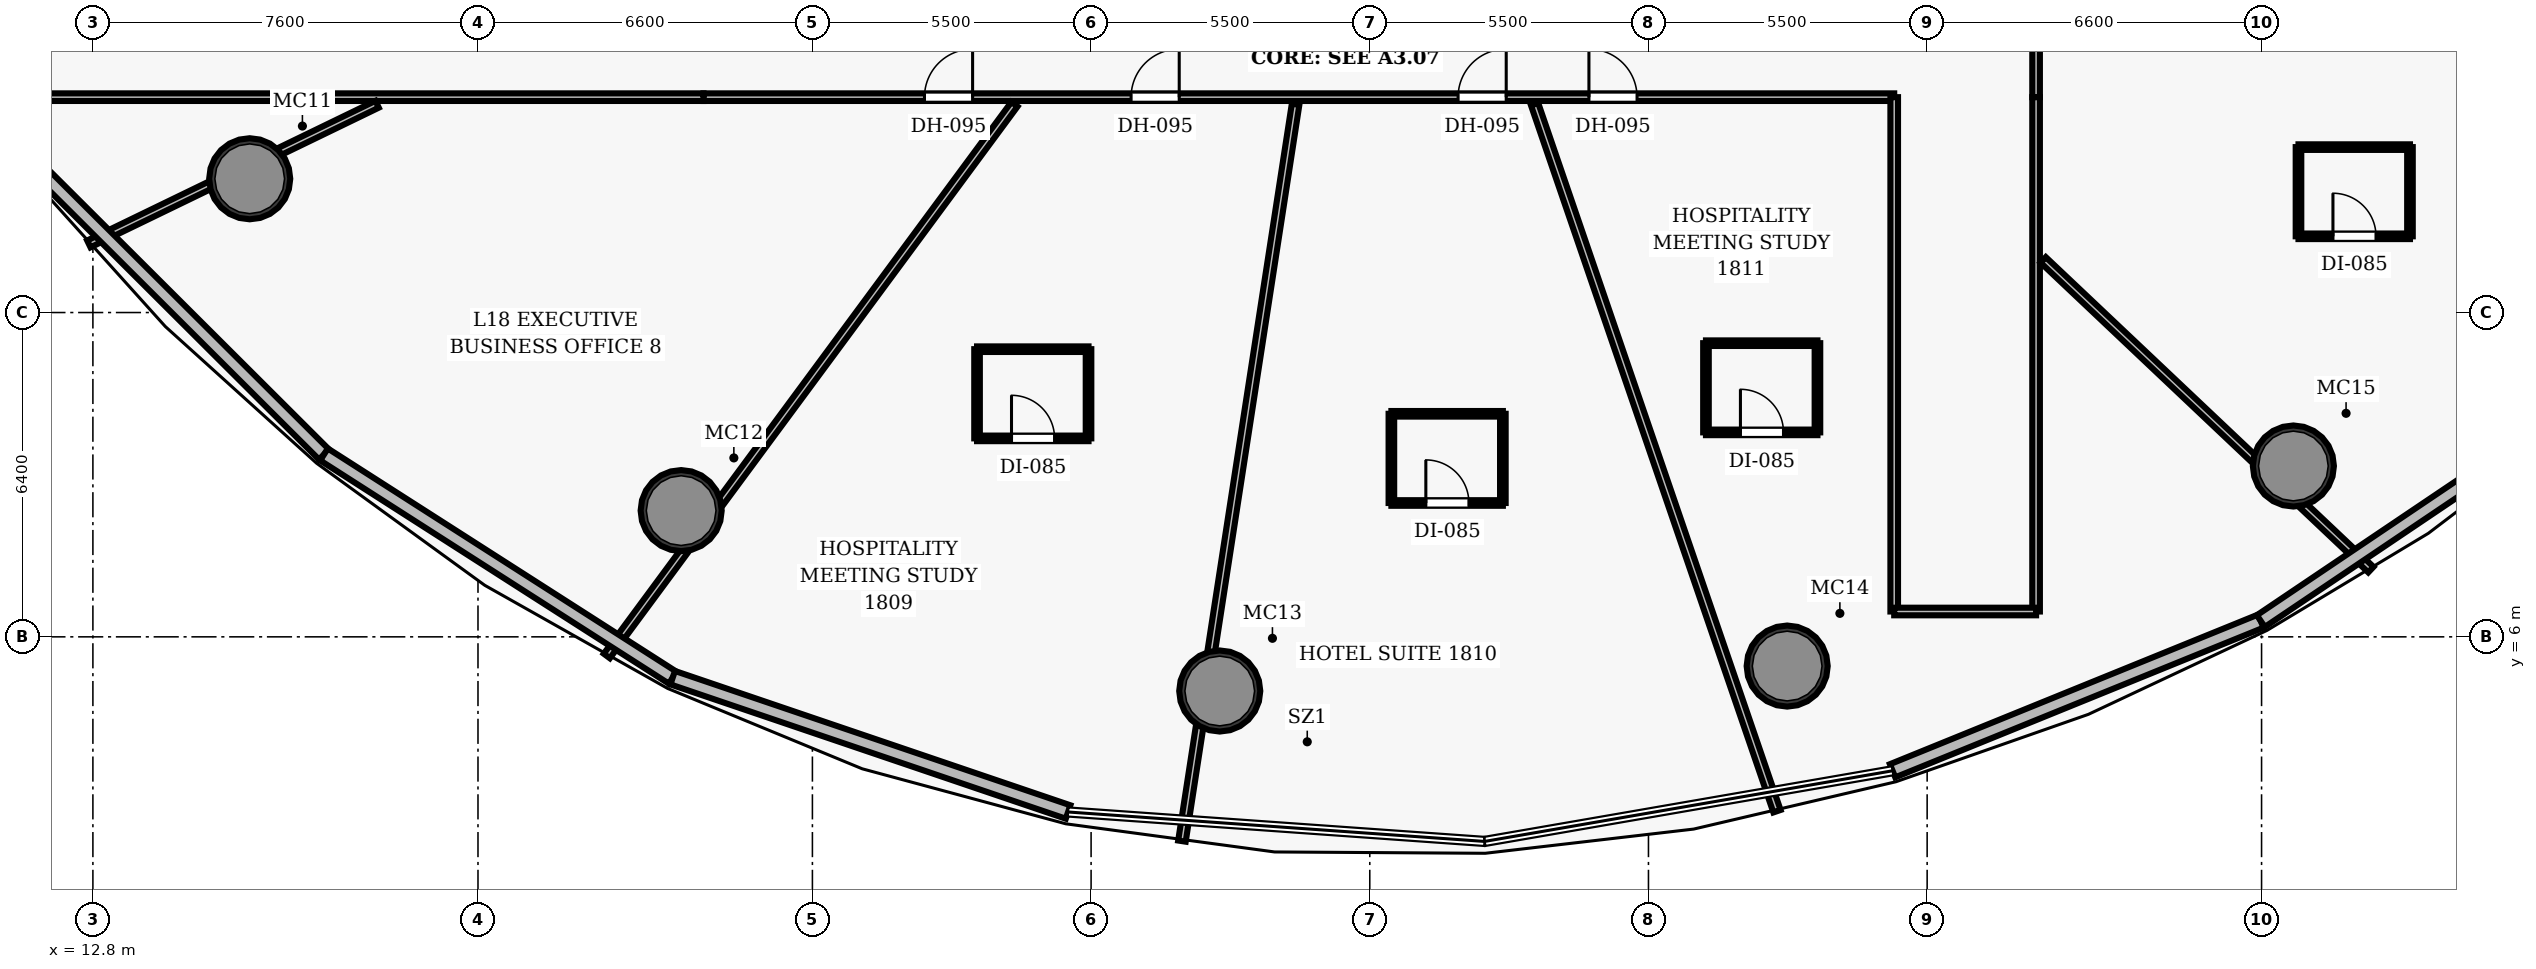
"""IFC4 building model, lengths in metres.
Left out: names, types, materials, properties, quantities, classifications, styles, units other than length and angle.
Written with IfcOpenShell. Run it as: python <this file> out.ifc"""

import sys

from ifc_helpers import new_model, si_unit, direction, frame, frame_2d, origin, origin_2d, place, context, subcontext, project, spatial, rectangle, hollow_circle, extrude, element, fill, save


model = new_model("IFC4")
c1 = context("Model", 3, precision=1e-05, world=origin(), true_north=direction((0.0, 1.0)))
c2 = subcontext(c1, "Body", "Model", "MODEL_VIEW")
j1 = project(units=[si_unit("LENGTHUNIT", "METRE"), si_unit("PLANEANGLEUNIT", "RADIAN")], contexts=[c1])
p1 = place(None, origin())
s1 = spatial("IfcSite", under=j1, at=p1, CompositionType="ELEMENT")
p2 = place(p1, origin())
s2 = spatial("IfcBuilding", under=s1, at=p2, CompositionType="ELEMENT")
p3 = place(p2, frame((0.0, 0.0, 79.9)))
s3 = spatial("IfcBuildingStorey", under=s2, at=p3, CompositionType="ELEMENT", Elevation=79.9)
for number, where, z_axis, x_axis in (
    (1, (15.895, 15.04, 0.0), (0.0, 0.0, 1.0), (1.0, 0.0, 0.0)),
    (2, (24.41, 8.491, 0.0), (0.0, 0.0, 1.0), (1.0, 0.0, 0.0)),
    (3, (35.039, 4.931, 0.0), (0.0, 0.0, 1.0), (1.0, 0.0, 0.0)),
    (4, (46.238, 5.423, 0.0), (0.0, 0.0, 1.0), (1.0, 0.0, 0.0)),
    (5, (56.228, 9.371, 0.0), (0.0, 0.0, 1.0), (1.0, 0.0, 0.0)),
):
    element("IfcColumn", number, at=place(p3, frame(where, z_axis=z_axis, x_axis=x_axis)), inside=s3, PredefinedType="COLUMN", context=c2, shape_type="SweptSolid", body=[
        extrude(hollow_circle(Radius=0.8, WallThickness=0.06, at=origin_2d()), origin(), (0.0, 0.0, 1.0), 3.5),
    ])
p4 = place(p3, frame((24.85, 16.65, 0.0), z_axis=(0.0, 0.0, 1.0), x_axis=(1.0, 0.0, 0.0)))
e6 = element("IfcWall", 6, at=p4, inside=s3, PredefinedType="PARTITIONING", context=c2, shape_type="SweptSolid", body=[
    extrude(rectangle(XDim=23.5, YDim=0.15, at=frame_2d((11.75, 0.0))), origin(), (0.0, 0.0, 1.0), 2.6),
])
p5 = place(p4, frame((4.362, 0.0, 0.0)))
e7 = element("IfcOpeningElement", 7, at=p5, cuts=e6, PredefinedType="OPENING", context=c2, shape_type="SweptSolid", body=[
    extrude(rectangle(XDim=0.95, YDim=2.15, at=frame_2d((0.475, 1.075))), frame((0.0, 0.085, 0.0), z_axis=(0.0, -1.0, 0.0), x_axis=(1.0, 0.0, 0.0)), (0.0, 0.0, 1.0), 0.17),
])
p6 = place(p4, frame((8.439, 0.0, 0.0)))
e8 = element("IfcOpeningElement", 8, at=p6, cuts=e6, PredefinedType="OPENING", context=c2, shape_type="SweptSolid", body=[
    extrude(rectangle(XDim=0.95, YDim=2.15, at=frame_2d((0.475, 1.075))), frame((0.0, 0.085, 0.0), z_axis=(0.0, -1.0, 0.0), x_axis=(1.0, 0.0, 0.0)), (0.0, 0.0, 1.0), 0.17),
])
p7 = place(p4, frame((14.893, 0.0, 0.0)))
e9 = element("IfcOpeningElement", 9, at=p7, cuts=e6, PredefinedType="OPENING", context=c2, shape_type="SweptSolid", body=[
    extrude(rectangle(XDim=0.95, YDim=2.15, at=frame_2d((0.475, 1.075))), frame((0.0, 0.085, 0.0), z_axis=(0.0, -1.0, 0.0), x_axis=(1.0, 0.0, 0.0)), (0.0, 0.0, 1.0), 0.17),
])
p8 = place(p4, frame((17.475, 0.0, 0.0)))
e10 = element("IfcOpeningElement", 10, at=p8, cuts=e6, PredefinedType="OPENING", context=c2, shape_type="SweptSolid", body=[
    extrude(rectangle(XDim=0.95, YDim=2.15, at=frame_2d((0.475, 1.075))), frame((0.0, 0.085, 0.0), z_axis=(0.0, -1.0, 0.0), x_axis=(1.0, 0.0, 0.0)), (0.0, 0.0, 1.0), 0.17),
])
p9 = place(p3, frame((51.15, 16.65, 0.0), z_axis=(0.0, 0.0, 1.0), x_axis=(0.0, 1.0, 0.0)))
e11 = element("IfcWall", 11, at=p9, inside=s3, PredefinedType="PARTITIONING", context=c2, shape_type="SweptSolid", body=[
    extrude(rectangle(XDim=15.9, YDim=0.15, at=frame_2d((7.95, 0.0))), origin(), (0.0, 0.0, 1.0), 2.6),
])
p10 = place(p9, frame((12.808, 0.0, 0.0)))
e12 = element("IfcOpeningElement", 12, at=p10, cuts=e11, PredefinedType="OPENING", context=c2, shape_type="SweptSolid", body=[
    extrude(rectangle(XDim=0.95, YDim=2.15, at=frame_2d((0.475, 1.075))), frame((0.0, 0.085, 0.0), z_axis=(0.0, -1.0, 0.0), x_axis=(1.0, 0.0, 0.0)), (0.0, 0.0, 1.0), 0.17),
])
p11 = place(p9, frame((3.964, 0.0, 0.0)))
e13 = element("IfcOpeningElement", 13, at=p11, cuts=e11, PredefinedType="OPENING", context=c2, shape_type="SweptSolid", body=[
    extrude(rectangle(XDim=0.95, YDim=2.15, at=frame_2d((0.475, 1.075))), frame((0.0, 0.085, 0.0), z_axis=(0.0, -1.0, 0.0), x_axis=(1.0, 0.0, 0.0)), (0.0, 0.0, 1.0), 0.17),
])
p12 = place(p9, frame((7.35, 0.0, 0.0)))
e14 = element("IfcOpeningElement", 14, at=p12, cuts=e11, PredefinedType="OPENING", context=c2, shape_type="SweptSolid", body=[
    extrude(rectangle(XDim=0.95, YDim=2.15, at=frame_2d((0.475, 1.075))), frame((0.0, 0.085, 0.0), z_axis=(0.0, -1.0, 0.0), x_axis=(1.0, 0.0, 0.0)), (0.0, 0.0, 1.0), 0.17),
])
p13 = place(p3, frame((11.439, 16.65, 0.0), z_axis=(0.0, 0.0, 1.0), x_axis=(1.0, 0.0, 0.0)))
e15 = element("IfcWall", 15, at=p13, inside=s3, PredefinedType="PARTITIONING", context=c2, shape_type="SweptSolid", body=[
    extrude(rectangle(XDim=13.411, YDim=0.15, at=frame_2d((6.706, 0.0))), origin(), (0.0, 0.0, 1.0), 2.6),
])
for number, where, z_axis, x_axis in (
    (16, (48.35, 6.5, 0.0), (0.0, 0.0, 1.0), (0.0, 1.0, 0.0)),
    (17, (51.15, 6.5, 0.0), (0.0, 0.0, 1.0), (0.0, 1.0, 0.0)),
):
    element("IfcWall", number, at=place(p3, frame(where, z_axis=z_axis, x_axis=x_axis)), inside=s3, PredefinedType="PARTITIONING", context=c2, shape_type="SweptSolid", body=[
        extrude(rectangle(XDim=10.15, YDim=0.15, at=frame_2d((5.075, 0.0))), origin(), (0.0, 0.0, 1.0), 2.6),
    ])
p14 = place(p3, frame((48.35, 6.5, 0.0), z_axis=(0.0, 0.0, 1.0), x_axis=(1.0, 0.0, 0.0)))
e18 = element("IfcWall", 18, at=p14, inside=s3, PredefinedType="PARTITIONING", context=c2, shape_type="SweptSolid", body=[
    extrude(rectangle(XDim=2.8, YDim=0.15, at=frame_2d((1.4, 0.0))), origin(), (0.0, 0.0, 1.0), 2.6),
])
p15 = place(p3, frame((18.409, 16.51, 0.0), z_axis=(0.0, 0.0, 1.0), x_axis=(-0.899956937803, -0.435978795471, 0.0)))
e19 = element("IfcWall", 19, at=p15, inside=s3, PredefinedType="PARTITIONING", context=c2, shape_type="SweptSolid", body=[
    extrude(rectangle(XDim=6.322, YDim=0.15, at=frame_2d((3.161, 0.0))), origin(), (0.0, 0.0, 1.0), 2.6),
])
p16 = place(p3, frame((30.988, 16.51, 0.0), z_axis=(0.0, 0.0, 1.0), x_axis=(-0.594283048569, -0.804255965587, 0.0)))
e20 = element("IfcWall", 20, at=p16, inside=s3, PredefinedType="PARTITIONING", context=c2, shape_type="SweptSolid", body=[
    extrude(rectangle(XDim=13.538, YDim=0.15, at=frame_2d((6.769, 0.0))), origin(), (0.0, 0.0, 1.0), 2.6),
])
p17 = place(p3, frame((36.536, 16.51, 0.0), z_axis=(0.0, 0.0, 1.0), x_axis=(-0.152461170768, -0.988309461357, 0.0)))
e21 = element("IfcWall", 21, at=p17, inside=s3, PredefinedType="PARTITIONING", context=c2, shape_type="SweptSolid", body=[
    extrude(rectangle(XDim=14.713, YDim=0.15, at=frame_2d((7.356, 0.0))), origin(), (0.0, 0.0, 1.0), 2.6),
])
p18 = place(p3, frame((41.253, 16.51, 0.0), z_axis=(0.0, 0.0, 1.0), x_axis=(0.324291313021, -0.945957263464, 0.0)))
e22 = element("IfcWall", 22, at=p18, inside=s3, PredefinedType="PARTITIONING", context=c2, shape_type="SweptSolid", body=[
    extrude(rectangle(XDim=14.748, YDim=0.15, at=frame_2d((7.374, 0.0))), origin(), (0.0, 0.0, 1.0), 2.6),
])
p19 = place(p3, frame((51.29, 13.439, 0.0), z_axis=(0.0, 0.0, 1.0), x_axis=(0.72675745836, -0.686894167043, 0.0)))
e23 = element("IfcWall", 23, at=p19, inside=s3, PredefinedType="PARTITIONING", context=c2, shape_type="SweptSolid", body=[
    extrude(rectangle(XDim=8.899, YDim=0.15, at=frame_2d((4.449, 0.0))), origin(), (0.0, 0.0, 1.0), 2.6),
])
p20 = place(p3, frame((30.249, 9.917, 0.0), z_axis=(0.0, 0.0, 1.0), x_axis=(1.0, 0.0, 0.0)))
e24 = element("IfcWall", 24, at=p20, inside=s3, PredefinedType="PARTITIONING", context=c2, shape_type="SweptSolid", body=[
    extrude(rectangle(XDim=2.2, YDim=0.11, at=frame_2d((1.1, 0.0))), origin(), (0.0, 0.0, 1.0), 2.6),
])
p21 = place(p20, frame((0.68, 0.0, 0.0)))
e25 = element("IfcOpeningElement", 25, at=p21, cuts=e24, PredefinedType="OPENING", context=c2, shape_type="SweptSolid", body=[
    extrude(rectangle(XDim=0.85, YDim=2.1, at=frame_2d((0.425, 1.05))), frame((0.0, 0.065, 0.0), z_axis=(0.0, -1.0, 0.0), x_axis=(1.0, 0.0, 0.0)), (0.0, 0.0, 1.0), 0.13),
])
p22 = place(p3, frame((30.249, 11.677, 0.0), z_axis=(0.0, 0.0, 1.0), x_axis=(1.0, 0.0, 0.0)))
e26 = element("IfcWall", 26, at=p22, inside=s3, PredefinedType="PARTITIONING", context=c2, shape_type="SweptSolid", body=[
    extrude(rectangle(XDim=2.2, YDim=0.11, at=frame_2d((1.1, 0.0))), origin(), (0.0, 0.0, 1.0), 2.6),
])
for number, where, z_axis, x_axis in (
    (27, (30.249, 9.917, 0.0), (0.0, 0.0, 1.0), (0.0, 1.0, 0.0)),
    (28, (32.449, 9.917, 0.0), (0.0, 0.0, 1.0), (0.0, 1.0, 0.0)),
):
    element("IfcWall", number, at=place(p3, frame(where, z_axis=z_axis, x_axis=x_axis)), inside=s3, PredefinedType="PARTITIONING", context=c2, shape_type="SweptSolid", body=[
        extrude(rectangle(XDim=1.76, YDim=0.11, at=frame_2d((0.88, 0.0))), origin(), (0.0, 0.0, 1.0), 2.6),
    ])
p23 = place(p3, frame((38.427, 8.642, 0.0), z_axis=(0.0, 0.0, 1.0), x_axis=(1.0, 0.0, 0.0)))
e29 = element("IfcWall", 29, at=p23, inside=s3, PredefinedType="PARTITIONING", context=c2, shape_type="SweptSolid", body=[
    extrude(rectangle(XDim=2.2, YDim=0.11, at=frame_2d((1.1, 0.0))), origin(), (0.0, 0.0, 1.0), 2.6),
])
p24 = place(p23, frame((0.68, 0.0, 0.0)))
e30 = element("IfcOpeningElement", 30, at=p24, cuts=e29, PredefinedType="OPENING", context=c2, shape_type="SweptSolid", body=[
    extrude(rectangle(XDim=0.85, YDim=2.1, at=frame_2d((0.425, 1.05))), frame((0.0, 0.065, 0.0), z_axis=(0.0, -1.0, 0.0), x_axis=(1.0, 0.0, 0.0)), (0.0, 0.0, 1.0), 0.13),
])
p25 = place(p3, frame((38.427, 10.402, 0.0), z_axis=(0.0, 0.0, 1.0), x_axis=(1.0, 0.0, 0.0)))
e31 = element("IfcWall", 31, at=p25, inside=s3, PredefinedType="PARTITIONING", context=c2, shape_type="SweptSolid", body=[
    extrude(rectangle(XDim=2.2, YDim=0.11, at=frame_2d((1.1, 0.0))), origin(), (0.0, 0.0, 1.0), 2.6),
])
for number, where, z_axis, x_axis in (
    (32, (38.427, 8.642, 0.0), (0.0, 0.0, 1.0), (0.0, 1.0, 0.0)),
    (33, (40.626, 8.642, 0.0), (0.0, 0.0, 1.0), (0.0, 1.0, 0.0)),
):
    element("IfcWall", number, at=place(p3, frame(where, z_axis=z_axis, x_axis=x_axis)), inside=s3, PredefinedType="PARTITIONING", context=c2, shape_type="SweptSolid", body=[
        extrude(rectangle(XDim=1.76, YDim=0.11, at=frame_2d((0.88, 0.0))), origin(), (0.0, 0.0, 1.0), 2.6),
    ])
p26 = place(p3, frame((44.635, 10.035, 0.0), z_axis=(0.0, 0.0, 1.0), x_axis=(1.0, 0.0, 0.0)))
e34 = element("IfcWall", 34, at=p26, inside=s3, PredefinedType="PARTITIONING", context=c2, shape_type="SweptSolid", body=[
    extrude(rectangle(XDim=2.2, YDim=0.11, at=frame_2d((1.1, 0.0))), origin(), (0.0, 0.0, 1.0), 2.6),
])
p27 = place(p26, frame((0.68, 0.0, 0.0)))
e35 = element("IfcOpeningElement", 35, at=p27, cuts=e34, PredefinedType="OPENING", context=c2, shape_type="SweptSolid", body=[
    extrude(rectangle(XDim=0.85, YDim=2.1, at=frame_2d((0.425, 1.05))), frame((0.0, 0.065, 0.0), z_axis=(0.0, -1.0, 0.0), x_axis=(1.0, 0.0, 0.0)), (0.0, 0.0, 1.0), 0.13),
])
p28 = place(p3, frame((44.635, 11.795, 0.0), z_axis=(0.0, 0.0, 1.0), x_axis=(1.0, 0.0, 0.0)))
e36 = element("IfcWall", 36, at=p28, inside=s3, PredefinedType="PARTITIONING", context=c2, shape_type="SweptSolid", body=[
    extrude(rectangle(XDim=2.2, YDim=0.11, at=frame_2d((1.1, 0.0))), origin(), (0.0, 0.0, 1.0), 2.6),
])
for number, where, z_axis, x_axis in (
    (37, (44.635, 10.035, 0.0), (0.0, 0.0, 1.0), (0.0, 1.0, 0.0)),
    (38, (46.835, 10.035, 0.0), (0.0, 0.0, 1.0), (0.0, 1.0, 0.0)),
):
    element("IfcWall", number, at=place(p3, frame(where, z_axis=z_axis, x_axis=x_axis)), inside=s3, PredefinedType="PARTITIONING", context=c2, shape_type="SweptSolid", body=[
        extrude(rectangle(XDim=1.76, YDim=0.11, at=frame_2d((0.88, 0.0))), origin(), (0.0, 0.0, 1.0), 2.6),
    ])
p29 = place(p3, frame((56.329, 13.904, 0.0), z_axis=(0.0, 0.0, 1.0), x_axis=(1.0, 0.0, 0.0)))
e39 = element("IfcWall", 39, at=p29, inside=s3, PredefinedType="PARTITIONING", context=c2, shape_type="SweptSolid", body=[
    extrude(rectangle(XDim=2.2, YDim=0.11, at=frame_2d((1.1, 0.0))), origin(), (0.0, 0.0, 1.0), 2.6),
])
p30 = place(p29, frame((0.68, 0.0, 0.0)))
e40 = element("IfcOpeningElement", 40, at=p30, cuts=e39, PredefinedType="OPENING", context=c2, shape_type="SweptSolid", body=[
    extrude(rectangle(XDim=0.85, YDim=2.1, at=frame_2d((0.425, 1.05))), frame((0.0, 0.065, 0.0), z_axis=(0.0, -1.0, 0.0), x_axis=(1.0, 0.0, 0.0)), (0.0, 0.0, 1.0), 0.13),
])
p31 = place(p3, frame((56.329, 15.664, 0.0), z_axis=(0.0, 0.0, 1.0), x_axis=(1.0, 0.0, 0.0)))
e41 = element("IfcWall", 41, at=p31, inside=s3, PredefinedType="PARTITIONING", context=c2, shape_type="SweptSolid", body=[
    extrude(rectangle(XDim=2.2, YDim=0.11, at=frame_2d((1.1, 0.0))), origin(), (0.0, 0.0, 1.0), 2.6),
])
for number, where, z_axis, x_axis in (
    (42, (56.329, 13.904, 0.0), (0.0, 0.0, 1.0), (0.0, 1.0, 0.0)),
    (43, (58.529, 13.904, 0.0), (0.0, 0.0, 1.0), (0.0, 1.0, 0.0)),
):
    element("IfcWall", number, at=place(p3, frame(where, z_axis=z_axis, x_axis=x_axis)), inside=s3, PredefinedType="PARTITIONING", context=c2, shape_type="SweptSolid", body=[
        extrude(rectangle(XDim=1.76, YDim=0.11, at=frame_2d((0.88, 0.0))), origin(), (0.0, 0.0, 1.0), 2.6),
    ])
p32 = place(p3, frame((17.361, 9.599, 0.0), z_axis=(0.0, 0.0, 1.0), x_axis=(-0.708133036794, 0.706079033962, 0.0)))
e44 = element("IfcWall", 44, at=p32, inside=s3, PredefinedType="SOLIDWALL", context=c2, shape_type="SweptSolid", body=[
    extrude(rectangle(XDim=7.845, YDim=0.28, at=frame_2d((3.922, 0.0))), origin(), (0.0, 0.0, 1.0), 3.25),
])
p33 = place(p3, frame((24.242, 5.194, 0.0), z_axis=(0.0, 0.0, 1.0), x_axis=(-0.842190536118, 0.539180026405, 0.0)))
e45 = element("IfcWall", 45, at=p33, inside=s3, PredefinedType="SOLIDWALL", context=c2, shape_type="SweptSolid", body=[
    extrude(rectangle(XDim=8.171, YDim=0.28, at=frame_2d((4.085, 0.0))), origin(), (0.0, 0.0, 1.0), 3.25),
])
p34 = place(p3, frame((32.046, 2.544, 0.0), z_axis=(0.0, 0.0, 1.0), x_axis=(-0.946896905439, 0.321537323603, 0.0)))
e46 = element("IfcWall", 46, at=p34, inside=s3, PredefinedType="SOLIDWALL", context=c2, shape_type="SweptSolid", body=[
    extrude(rectangle(XDim=8.241, YDim=0.28, at=frame_2d((4.121, 0.0))), origin(), (0.0, 0.0, 1.0), 3.25),
])
p35 = place(p3, frame((55.586, 6.311, 0.0), z_axis=(0.0, 0.0, 1.0), x_axis=(-0.926415021548, -0.376503928067, 0.0)))
e47 = element("IfcWall", 47, at=p35, inside=s3, PredefinedType="SOLIDWALL", context=c2, shape_type="SweptSolid", body=[
    extrude(rectangle(XDim=7.845, YDim=0.28, at=frame_2d((3.922, 0.0))), origin(), (0.0, 0.0, 1.0), 3.25),
])
p36 = place(p3, frame((61.51, 10.301, 0.0), z_axis=(0.0, 0.0, 1.0), x_axis=(-0.829395880277, -0.558661322967, 0.0)))
e48 = element("IfcWall", 48, at=p36, inside=s3, PredefinedType="SOLIDWALL", context=c2, shape_type="SweptSolid", body=[
    extrude(rectangle(XDim=7.143, YDim=0.28, at=frame_2d((3.571, 0.0))), origin(), (0.0, 0.0, 1.0), 3.25),
])
p37 = place(p5, origin())
e49 = element("IfcDoor", 49, at=p37, inside=s3, OperationType="SINGLE_SWING_RIGHT", PredefinedType="DOOR", context=c2, shape_type="SweptSolid", body=[
    extrude(rectangle(XDim=0.95, YDim=2.15, at=frame_2d((0.475, 1.075))), frame((0.0, 0.025, 0.0), z_axis=(0.0, -1.0, 0.0), x_axis=(1.0, 0.0, 0.0)), (0.0, 0.0, 1.0), 0.05),
])
fill(e7, e49)
p38 = place(p6, origin())
e50 = element("IfcDoor", 50, at=p38, inside=s3, OperationType="SINGLE_SWING_RIGHT", PredefinedType="DOOR", context=c2, shape_type="SweptSolid", body=[
    extrude(rectangle(XDim=0.95, YDim=2.15, at=frame_2d((0.475, 1.075))), frame((0.0, 0.025, 0.0), z_axis=(0.0, -1.0, 0.0), x_axis=(1.0, 0.0, 0.0)), (0.0, 0.0, 1.0), 0.05),
])
fill(e8, e50)
p39 = place(p21, origin())
e51 = element("IfcDoor", 51, at=p39, inside=s3, OperationType="SINGLE_SWING_LEFT", PredefinedType="DOOR", context=c2, shape_type="SweptSolid", body=[
    extrude(rectangle(XDim=0.85, YDim=2.1, at=frame_2d((0.425, 1.05))), frame((0.0, 0.025, 0.0), z_axis=(0.0, -1.0, 0.0), x_axis=(1.0, 0.0, 0.0)), (0.0, 0.0, 1.0), 0.05),
])
fill(e25, e51)
p40 = place(p7, origin())
e52 = element("IfcDoor", 52, at=p40, inside=s3, OperationType="SINGLE_SWING_RIGHT", PredefinedType="DOOR", context=c2, shape_type="SweptSolid", body=[
    extrude(rectangle(XDim=0.95, YDim=2.15, at=frame_2d((0.475, 1.075))), frame((0.0, 0.025, 0.0), z_axis=(0.0, -1.0, 0.0), x_axis=(1.0, 0.0, 0.0)), (0.0, 0.0, 1.0), 0.05),
])
fill(e9, e52)
p41 = place(p24, origin())
e53 = element("IfcDoor", 53, at=p41, inside=s3, OperationType="SINGLE_SWING_LEFT", PredefinedType="DOOR", context=c2, shape_type="SweptSolid", body=[
    extrude(rectangle(XDim=0.85, YDim=2.1, at=frame_2d((0.425, 1.05))), frame((0.0, 0.025, 0.0), z_axis=(0.0, -1.0, 0.0), x_axis=(1.0, 0.0, 0.0)), (0.0, 0.0, 1.0), 0.05),
])
fill(e30, e53)
p42 = place(p8, origin())
e54 = element("IfcDoor", 54, at=p42, inside=s3, OperationType="SINGLE_SWING_LEFT", PredefinedType="DOOR", context=c2, shape_type="SweptSolid", body=[
    extrude(rectangle(XDim=0.95, YDim=2.15, at=frame_2d((0.475, 1.075))), frame((0.0, 0.025, 0.0), z_axis=(0.0, -1.0, 0.0), x_axis=(1.0, 0.0, 0.0)), (0.0, 0.0, 1.0), 0.05),
])
fill(e10, e54)
p43 = place(p27, origin())
e55 = element("IfcDoor", 55, at=p43, inside=s3, OperationType="SINGLE_SWING_LEFT", PredefinedType="DOOR", context=c2, shape_type="SweptSolid", body=[
    extrude(rectangle(XDim=0.85, YDim=2.1, at=frame_2d((0.425, 1.05))), frame((0.0, 0.025, 0.0), z_axis=(0.0, -1.0, 0.0), x_axis=(1.0, 0.0, 0.0)), (0.0, 0.0, 1.0), 0.05),
])
fill(e35, e55)
p44 = place(p30, origin())
e56 = element("IfcDoor", 56, at=p44, inside=s3, OperationType="SINGLE_SWING_LEFT", PredefinedType="DOOR", context=c2, shape_type="SweptSolid", body=[
    extrude(rectangle(XDim=0.85, YDim=2.1, at=frame_2d((0.425, 1.05))), frame((0.0, 0.025, 0.0), z_axis=(0.0, -1.0, 0.0), x_axis=(1.0, 0.0, 0.0)), (0.0, 0.0, 1.0), 0.05),
])
fill(e40, e56)
save(model, sys.argv[1])
